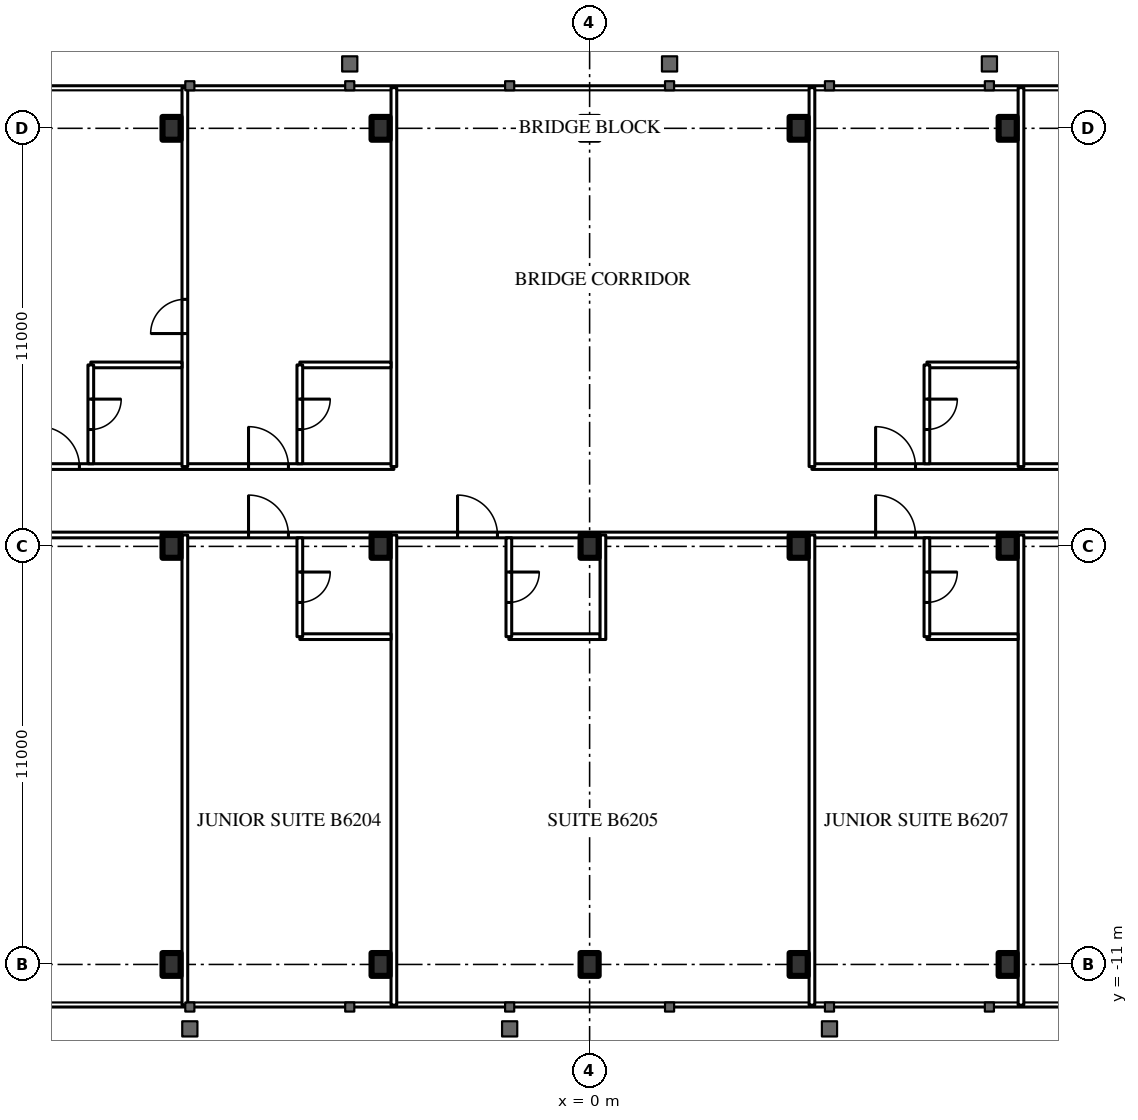
"""IFC4 building model, lengths in metres.
Left out: names, types, materials, properties, quantities, classifications, styles, units other than length and angle.
Written with IfcOpenShell. Run it as: python <this file> out.ifc"""

import sys

from ifc_helpers import new_model, si_unit, direction, frame, frame_2d, origin, origin_2d, place, context, subcontext, project, spatial, rectangle, i_section, extrude, element, fill, save


model = new_model("IFC4")
c1 = context("Model", 3, precision=1e-05, world=origin(), true_north=direction((0.0, 1.0)))
c2 = subcontext(c1, "Body", "Model", "MODEL_VIEW")
j1 = project(units=[si_unit("LENGTHUNIT", "METRE"), si_unit("PLANEANGLEUNIT", "RADIAN")], contexts=[c1])
p1 = place(None, origin())
s1 = spatial("IfcSite", under=j1, at=p1, CompositionType="ELEMENT")
p2 = place(p1, origin())
s2 = spatial("IfcBuilding", under=s1, at=p2, CompositionType="ELEMENT")
p3 = place(p2, frame((0.0, 0.0, 233.3)))
s3 = spatial("IfcBuildingStorey", under=s2, at=p3, CompositionType="ELEMENT", Elevation=233.3)
for number, where, z_axis, x_axis in (
    (1, (-11.0, -11.0, 0.0), (0.0, 0.0, 1.0), (1.0, 0.0, 0.0)),
    (2, (-5.5, -11.0, 0.0), (0.0, 0.0, 1.0), (1.0, 0.0, 0.0)),
    (3, (0.0, -11.0, 0.0), (0.0, 0.0, 1.0), (1.0, 0.0, 0.0)),
    (4, (5.5, -11.0, 0.0), (0.0, 0.0, 1.0), (1.0, 0.0, 0.0)),
    (5, (11.0, -11.0, 0.0), (0.0, 0.0, 1.0), (1.0, 0.0, 0.0)),
    (6, (-11.0, 0.0, 0.0), (0.0, 0.0, 1.0), (1.0, 0.0, 0.0)),
    (7, (-5.5, 0.0, 0.0), (0.0, 0.0, 1.0), (1.0, 0.0, 0.0)),
    (8, (0.0, 0.0, 0.0), (0.0, 0.0, 1.0), (1.0, 0.0, 0.0)),
    (9, (5.5, 0.0, 0.0), (0.0, 0.0, 1.0), (1.0, 0.0, 0.0)),
    (10, (11.0, 0.0, 0.0), (0.0, 0.0, 1.0), (1.0, 0.0, 0.0)),
    (11, (-11.0, 11.0, 0.0), (0.0, 0.0, 1.0), (1.0, 0.0, 0.0)),
    (12, (-5.5, 11.0, 0.0), (0.0, 0.0, 1.0), (1.0, 0.0, 0.0)),
    (13, (0.0, 11.0, 0.0), (0.0, 0.0, 1.0), (1.0, 0.0, 0.0)),
    (14, (5.5, 11.0, 0.0), (0.0, 0.0, 1.0), (1.0, 0.0, 0.0)),
    (15, (11.0, 11.0, 0.0), (0.0, 0.0, 1.0), (1.0, 0.0, 0.0)),
):
    element("IfcColumn", number, at=place(p3, frame(where, z_axis=z_axis, x_axis=x_axis)), inside=s3, PredefinedType="COLUMN", context=c2, shape_type="SweptSolid", body=[
        extrude(i_section(OverallWidth=0.476, OverallDepth=0.6, WebThickness=0.1, FlangeThickness=0.14, FilletRadius=0.02, at=origin_2d()), origin(), (0.0, 0.0, 1.0), 3.6),
    ])
p4 = place(p3, frame((-27.5, 0.3, 0.0), z_axis=(0.0, 0.0, 1.0), x_axis=(1.0, 0.0, 0.0)))
e16 = element("IfcWall", 16, at=p4, inside=s3, PredefinedType="PARTITIONING", context=c2, shape_type="SweptSolid", body=[
    extrude(rectangle(XDim=55.0, YDim=0.15, at=frame_2d((27.5, 0.0))), origin(), (0.0, 0.0, 1.0), 2.4),
])
p5 = place(p4, frame((1.575, 0.0, 0.0)))
e17 = element("IfcOpeningElement", 17, at=p5, cuts=e16, PredefinedType="OPENING", context=c2, shape_type="SweptSolid", body=[
    extrude(rectangle(XDim=1.0, YDim=2.2, at=frame_2d((0.5, 1.1))), frame((0.0, 0.085, 0.0), z_axis=(0.0, -1.0, 0.0), x_axis=(1.0, 0.0, 0.0)), (0.0, 0.0, 1.0), 0.17),
])
p6 = place(p4, frame((7.525, 0.0, 0.0)))
e18 = element("IfcOpeningElement", 18, at=p6, cuts=e16, PredefinedType="OPENING", context=c2, shape_type="SweptSolid", body=[
    extrude(rectangle(XDim=1.05, YDim=2.4, at=frame_2d((0.525, 1.2))), frame((0.0, 0.085, 0.0), z_axis=(0.0, -1.0, 0.0), x_axis=(1.0, 0.0, 0.0)), (0.0, 0.0, 1.0), 0.17),
])
p7 = place(p4, frame((18.525, 0.0, 0.0)))
e19 = element("IfcOpeningElement", 19, at=p7, cuts=e16, PredefinedType="OPENING", context=c2, shape_type="SweptSolid", body=[
    extrude(rectangle(XDim=1.05, YDim=2.4, at=frame_2d((0.525, 1.2))), frame((0.0, 0.085, 0.0), z_axis=(0.0, -1.0, 0.0), x_axis=(1.0, 0.0, 0.0)), (0.0, 0.0, 1.0), 0.17),
])
p8 = place(p4, frame((24.025, 0.0, 0.0)))
e20 = element("IfcOpeningElement", 20, at=p8, cuts=e16, PredefinedType="OPENING", context=c2, shape_type="SweptSolid", body=[
    extrude(rectangle(XDim=1.05, YDim=2.4, at=frame_2d((0.525, 1.2))), frame((0.0, 0.085, 0.0), z_axis=(0.0, -1.0, 0.0), x_axis=(1.0, 0.0, 0.0)), (0.0, 0.0, 1.0), 0.17),
])
p9 = place(p4, frame((35.025, 0.0, 0.0)))
e21 = element("IfcOpeningElement", 21, at=p9, cuts=e16, PredefinedType="OPENING", context=c2, shape_type="SweptSolid", body=[
    extrude(rectangle(XDim=1.05, YDim=2.4, at=frame_2d((0.525, 1.2))), frame((0.0, 0.085, 0.0), z_axis=(0.0, -1.0, 0.0), x_axis=(1.0, 0.0, 0.0)), (0.0, 0.0, 1.0), 0.17),
])
p10 = place(p4, frame((40.525, 0.0, 0.0)))
e22 = element("IfcOpeningElement", 22, at=p10, cuts=e16, PredefinedType="OPENING", context=c2, shape_type="SweptSolid", body=[
    extrude(rectangle(XDim=1.05, YDim=2.4, at=frame_2d((0.525, 1.2))), frame((0.0, 0.085, 0.0), z_axis=(0.0, -1.0, 0.0), x_axis=(1.0, 0.0, 0.0)), (0.0, 0.0, 1.0), 0.17),
])
p11 = place(p4, frame((52.525, 0.0, 0.0)))
e23 = element("IfcOpeningElement", 23, at=p11, cuts=e16, PredefinedType="OPENING", context=c2, shape_type="SweptSolid", body=[
    extrude(rectangle(XDim=1.05, YDim=2.4, at=frame_2d((0.525, 1.2))), frame((0.0, 0.085, 0.0), z_axis=(0.0, -1.0, 0.0), x_axis=(1.0, 0.0, 0.0)), (0.0, 0.0, 1.0), 0.17),
])
p12 = place(p3, frame((-27.5, 2.1, 0.0), z_axis=(0.0, 0.0, 1.0), x_axis=(1.0, 0.0, 0.0)))
e24 = element("IfcWall", 24, at=p12, inside=s3, PredefinedType="PARTITIONING", context=c2, shape_type="SweptSolid", body=[
    extrude(rectangle(XDim=22.35, YDim=0.15, at=frame_2d((11.175, 0.0))), origin(), (0.0, 0.0, 1.0), 3.4),
])
p13 = place(p12, frame((2.025, 0.0, 0.0)))
e25 = element("IfcOpeningElement", 25, at=p13, cuts=e24, PredefinedType="OPENING", context=c2, shape_type="SweptSolid", body=[
    extrude(rectangle(XDim=1.05, YDim=2.4, at=frame_2d((0.525, 1.2))), frame((0.0, 0.085, 0.0), z_axis=(0.0, -1.0, 0.0), x_axis=(1.0, 0.0, 0.0)), (0.0, 0.0, 1.0), 0.17),
])
p14 = place(p12, frame((7.525, 0.0, 0.0)))
e26 = element("IfcOpeningElement", 26, at=p14, cuts=e24, PredefinedType="OPENING", context=c2, shape_type="SweptSolid", body=[
    extrude(rectangle(XDim=1.05, YDim=2.4, at=frame_2d((0.525, 1.2))), frame((0.0, 0.085, 0.0), z_axis=(0.0, -1.0, 0.0), x_axis=(1.0, 0.0, 0.0)), (0.0, 0.0, 1.0), 0.17),
])
p15 = place(p12, frame((13.025, 0.0, 0.0)))
e27 = element("IfcOpeningElement", 27, at=p15, cuts=e24, PredefinedType="OPENING", context=c2, shape_type="SweptSolid", body=[
    extrude(rectangle(XDim=1.05, YDim=2.4, at=frame_2d((0.525, 1.2))), frame((0.0, 0.085, 0.0), z_axis=(0.0, -1.0, 0.0), x_axis=(1.0, 0.0, 0.0)), (0.0, 0.0, 1.0), 0.17),
])
p16 = place(p12, frame((18.525, 0.0, 0.0)))
e28 = element("IfcOpeningElement", 28, at=p16, cuts=e24, PredefinedType="OPENING", context=c2, shape_type="SweptSolid", body=[
    extrude(rectangle(XDim=1.05, YDim=2.4, at=frame_2d((0.525, 1.2))), frame((0.0, 0.085, 0.0), z_axis=(0.0, -1.0, 0.0), x_axis=(1.0, 0.0, 0.0)), (0.0, 0.0, 1.0), 0.17),
])
p17 = place(p3, frame((5.85, 2.1, 0.0), z_axis=(0.0, 0.0, 1.0), x_axis=(1.0, 0.0, 0.0)))
e29 = element("IfcWall", 29, at=p17, inside=s3, PredefinedType="PARTITIONING", context=c2, shape_type="SweptSolid", body=[
    extrude(rectangle(XDim=21.65, YDim=0.15, at=frame_2d((10.825, 0.0))), origin(), (0.0, 0.0, 1.0), 3.4),
])
p18 = place(p17, frame((1.675, 0.0, 0.0)))
e30 = element("IfcOpeningElement", 30, at=p18, cuts=e29, PredefinedType="OPENING", context=c2, shape_type="SweptSolid", body=[
    extrude(rectangle(XDim=1.05, YDim=2.4, at=frame_2d((0.525, 1.2))), frame((0.0, 0.085, 0.0), z_axis=(0.0, -1.0, 0.0), x_axis=(1.0, 0.0, 0.0)), (0.0, 0.0, 1.0), 0.17),
])
p19 = place(p17, frame((7.175, 0.0, 0.0)))
e31 = element("IfcOpeningElement", 31, at=p19, cuts=e29, PredefinedType="OPENING", context=c2, shape_type="SweptSolid", body=[
    extrude(rectangle(XDim=1.05, YDim=2.4, at=frame_2d((0.525, 1.2))), frame((0.0, 0.085, 0.0), z_axis=(0.0, -1.0, 0.0), x_axis=(1.0, 0.0, 0.0)), (0.0, 0.0, 1.0), 0.17),
])
p20 = place(p17, frame((19.175, 0.0, 0.0)))
e32 = element("IfcOpeningElement", 32, at=p20, cuts=e29, PredefinedType="OPENING", context=c2, shape_type="SweptSolid", body=[
    extrude(rectangle(XDim=1.05, YDim=2.4, at=frame_2d((0.525, 1.2))), frame((0.0, 0.085, 0.0), z_axis=(0.0, -1.0, 0.0), x_axis=(1.0, 0.0, 0.0)), (0.0, 0.0, 1.0), 0.17),
])
for number, where, z_axis, x_axis in (
    (33, (-10.65, -12.07, 0.0), (0.0, 0.0, 1.0), (0.0, 1.0, 0.0)),
    (34, (-5.15, -12.07, 0.0), (0.0, 0.0, 1.0), (0.0, 1.0, 0.0)),
    (35, (5.85, -12.07, 0.0), (0.0, 0.0, 1.0), (0.0, 1.0, 0.0)),
    (36, (11.35, -12.07, 0.0), (0.0, 0.0, 1.0), (0.0, 1.0, 0.0)),
):
    element("IfcWall", number, at=place(p3, frame(where, z_axis=z_axis, x_axis=x_axis)), inside=s3, PredefinedType="PARTITIONING", context=c2, shape_type="SweptSolid", body=[
        extrude(rectangle(XDim=12.37, YDim=0.15, at=frame_2d((6.185, 0.0))), origin(), (0.0, 0.0, 1.0), 3.4),
    ])
p21 = place(p3, frame((-7.625, -2.375, 0.0), z_axis=(0.0, 0.0, 1.0), x_axis=(1.0, 0.0, 0.0)))
e37 = element("IfcWall", 37, at=p21, inside=s3, PredefinedType="PARTITIONING", context=c2, shape_type="SweptSolid", body=[
    extrude(rectangle(XDim=2.4, YDim=0.15, at=frame_2d((1.2, 0.0))), origin(), (0.0, 0.0, 1.0), 3.4),
])
p22 = place(p3, frame((-7.625, -2.375, 0.0), z_axis=(0.0, 0.0, 1.0), x_axis=(0.0, 1.0, 0.0)))
e38 = element("IfcWall", 38, at=p22, inside=s3, PredefinedType="PARTITIONING", context=c2, shape_type="SweptSolid", body=[
    extrude(rectangle(XDim=2.6, YDim=0.15, at=frame_2d((1.3, 0.0))), origin(), (0.0, 0.0, 1.0), 3.4),
])
p23 = place(p22, frame((0.9, 0.0, 0.0)))
e39 = element("IfcOpeningElement", 39, at=p23, cuts=e38, PredefinedType="OPENING", context=c2, shape_type="SweptSolid", body=[
    extrude(rectangle(XDim=0.8, YDim=2.2, at=frame_2d((0.4, 1.1))), frame((0.0, 0.085, 0.0), z_axis=(0.0, -1.0, 0.0), x_axis=(1.0, 0.0, 0.0)), (0.0, 0.0, 1.0), 0.17),
])
p24 = place(p3, frame((-2.125, -2.375, 0.0), z_axis=(0.0, 0.0, 1.0), x_axis=(1.0, 0.0, 0.0)))
e40 = element("IfcWall", 40, at=p24, inside=s3, PredefinedType="PARTITIONING", context=c2, shape_type="SweptSolid", body=[
    extrude(rectangle(XDim=2.4, YDim=0.15, at=frame_2d((1.2, 0.0))), origin(), (0.0, 0.0, 1.0), 3.4),
])
p25 = place(p3, frame((-2.125, -2.375, 0.0), z_axis=(0.0, 0.0, 1.0), x_axis=(0.0, 1.0, 0.0)))
e41 = element("IfcWall", 41, at=p25, inside=s3, PredefinedType="PARTITIONING", context=c2, shape_type="SweptSolid", body=[
    extrude(rectangle(XDim=2.6, YDim=0.15, at=frame_2d((1.3, 0.0))), origin(), (0.0, 0.0, 1.0), 3.4),
])
p26 = place(p25, frame((0.9, 0.0, 0.0)))
e42 = element("IfcOpeningElement", 42, at=p26, cuts=e41, PredefinedType="OPENING", context=c2, shape_type="SweptSolid", body=[
    extrude(rectangle(XDim=0.8, YDim=2.2, at=frame_2d((0.4, 1.1))), frame((0.0, 0.085, 0.0), z_axis=(0.0, -1.0, 0.0), x_axis=(1.0, 0.0, 0.0)), (0.0, 0.0, 1.0), 0.17),
])
p27 = place(p3, frame((8.875, -2.375, 0.0), z_axis=(0.0, 0.0, 1.0), x_axis=(1.0, 0.0, 0.0)))
e43 = element("IfcWall", 43, at=p27, inside=s3, PredefinedType="PARTITIONING", context=c2, shape_type="SweptSolid", body=[
    extrude(rectangle(XDim=2.4, YDim=0.15, at=frame_2d((1.2, 0.0))), origin(), (0.0, 0.0, 1.0), 3.4),
])
p28 = place(p3, frame((8.875, -2.375, 0.0), z_axis=(0.0, 0.0, 1.0), x_axis=(0.0, 1.0, 0.0)))
e44 = element("IfcWall", 44, at=p28, inside=s3, PredefinedType="PARTITIONING", context=c2, shape_type="SweptSolid", body=[
    extrude(rectangle(XDim=2.6, YDim=0.15, at=frame_2d((1.3, 0.0))), origin(), (0.0, 0.0, 1.0), 3.4),
])
p29 = place(p28, frame((0.9, 0.0, 0.0)))
e45 = element("IfcOpeningElement", 45, at=p29, cuts=e44, PredefinedType="OPENING", context=c2, shape_type="SweptSolid", body=[
    extrude(rectangle(XDim=0.8, YDim=2.2, at=frame_2d((0.4, 1.1))), frame((0.0, 0.085, 0.0), z_axis=(0.0, -1.0, 0.0), x_axis=(1.0, 0.0, 0.0)), (0.0, 0.0, 1.0), 0.17),
])
p30 = place(p3, frame((-10.65, 2.1, 0.0), z_axis=(0.0, 0.0, 1.0), x_axis=(0.0, 1.0, 0.0)))
e46 = element("IfcWall", 46, at=p30, inside=s3, PredefinedType="PARTITIONING", context=c2, shape_type="SweptSolid", body=[
    extrude(rectangle(XDim=9.97, YDim=0.15, at=frame_2d((4.985, 0.0))), origin(), (0.0, 0.0, 1.0), 3.4),
])
p31 = place(p30, frame((3.5, 0.0, 0.0)))
e47 = element("IfcOpeningElement", 47, at=p31, cuts=e46, PredefinedType="OPENING", context=c2, shape_type="SweptSolid", body=[
    extrude(rectangle(XDim=0.9, YDim=2.2, at=frame_2d((0.45, 1.1))), frame((0.0, 0.085, 0.0), z_axis=(0.0, -1.0, 0.0), x_axis=(1.0, 0.0, 0.0)), (0.0, 0.0, 1.0), 0.17),
])
for number, where, z_axis, x_axis in (
    (48, (-5.15, 2.1, 0.0), (0.0, 0.0, 1.0), (0.0, 1.0, 0.0)),
    (49, (5.85, 2.1, 0.0), (0.0, 0.0, 1.0), (0.0, 1.0, 0.0)),
    (50, (11.35, 2.1, 0.0), (0.0, 0.0, 1.0), (0.0, 1.0, 0.0)),
):
    element("IfcWall", number, at=place(p3, frame(where, z_axis=z_axis, x_axis=x_axis)), inside=s3, PredefinedType="PARTITIONING", context=c2, shape_type="SweptSolid", body=[
        extrude(rectangle(XDim=9.97, YDim=0.15, at=frame_2d((4.985, 0.0))), origin(), (0.0, 0.0, 1.0), 3.4),
    ])
p32 = place(p3, frame((-13.125, 4.775, 0.0), z_axis=(0.0, 0.0, 1.0), x_axis=(1.0, 0.0, 0.0)))
e51 = element("IfcWall", 51, at=p32, inside=s3, PredefinedType="PARTITIONING", context=c2, shape_type="SweptSolid", body=[
    extrude(rectangle(XDim=2.4, YDim=0.15, at=frame_2d((1.2, 0.0))), origin(), (0.0, 0.0, 1.0), 3.4),
])
p33 = place(p3, frame((-13.125, 2.175, 0.0), z_axis=(0.0, 0.0, 1.0), x_axis=(0.0, 1.0, 0.0)))
e52 = element("IfcWall", 52, at=p33, inside=s3, PredefinedType="PARTITIONING", context=c2, shape_type="SweptSolid", body=[
    extrude(rectangle(XDim=2.6, YDim=0.15, at=frame_2d((1.3, 0.0))), origin(), (0.0, 0.0, 1.0), 3.4),
])
p34 = place(p33, frame((0.9, 0.0, 0.0)))
e53 = element("IfcOpeningElement", 53, at=p34, cuts=e52, PredefinedType="OPENING", context=c2, shape_type="SweptSolid", body=[
    extrude(rectangle(XDim=0.8, YDim=2.2, at=frame_2d((0.4, 1.1))), frame((0.0, 0.085, 0.0), z_axis=(0.0, -1.0, 0.0), x_axis=(1.0, 0.0, 0.0)), (0.0, 0.0, 1.0), 0.17),
])
p35 = place(p3, frame((-7.625, 4.775, 0.0), z_axis=(0.0, 0.0, 1.0), x_axis=(1.0, 0.0, 0.0)))
e54 = element("IfcWall", 54, at=p35, inside=s3, PredefinedType="PARTITIONING", context=c2, shape_type="SweptSolid", body=[
    extrude(rectangle(XDim=2.4, YDim=0.15, at=frame_2d((1.2, 0.0))), origin(), (0.0, 0.0, 1.0), 3.4),
])
p36 = place(p3, frame((-7.625, 2.175, 0.0), z_axis=(0.0, 0.0, 1.0), x_axis=(0.0, 1.0, 0.0)))
e55 = element("IfcWall", 55, at=p36, inside=s3, PredefinedType="PARTITIONING", context=c2, shape_type="SweptSolid", body=[
    extrude(rectangle(XDim=2.6, YDim=0.15, at=frame_2d((1.3, 0.0))), origin(), (0.0, 0.0, 1.0), 3.4),
])
p37 = place(p36, frame((0.9, 0.0, 0.0)))
e56 = element("IfcOpeningElement", 56, at=p37, cuts=e55, PredefinedType="OPENING", context=c2, shape_type="SweptSolid", body=[
    extrude(rectangle(XDim=0.8, YDim=2.2, at=frame_2d((0.4, 1.1))), frame((0.0, 0.085, 0.0), z_axis=(0.0, -1.0, 0.0), x_axis=(1.0, 0.0, 0.0)), (0.0, 0.0, 1.0), 0.17),
])
p38 = place(p3, frame((8.875, 4.775, 0.0), z_axis=(0.0, 0.0, 1.0), x_axis=(1.0, 0.0, 0.0)))
e57 = element("IfcWall", 57, at=p38, inside=s3, PredefinedType="PARTITIONING", context=c2, shape_type="SweptSolid", body=[
    extrude(rectangle(XDim=2.4, YDim=0.15, at=frame_2d((1.2, 0.0))), origin(), (0.0, 0.0, 1.0), 3.4),
])
p39 = place(p3, frame((8.875, 2.175, 0.0), z_axis=(0.0, 0.0, 1.0), x_axis=(0.0, 1.0, 0.0)))
e58 = element("IfcWall", 58, at=p39, inside=s3, PredefinedType="PARTITIONING", context=c2, shape_type="SweptSolid", body=[
    extrude(rectangle(XDim=2.6, YDim=0.15, at=frame_2d((1.3, 0.0))), origin(), (0.0, 0.0, 1.0), 3.4),
])
p40 = place(p39, frame((0.9, 0.0, 0.0)))
e59 = element("IfcOpeningElement", 59, at=p40, cuts=e58, PredefinedType="OPENING", context=c2, shape_type="SweptSolid", body=[
    extrude(rectangle(XDim=0.8, YDim=2.2, at=frame_2d((0.4, 1.1))), frame((0.0, 0.085, 0.0), z_axis=(0.0, -1.0, 0.0), x_axis=(1.0, 0.0, 0.0)), (0.0, 0.0, 1.0), 0.17),
])
p41 = place(p3, frame((0.35, -2.45, 0.0), z_axis=(0.0, 0.0, 1.0), x_axis=(0.0, 1.0, 0.0)))
e60 = element("IfcWall", 60, at=p41, inside=s3, PredefinedType="PARTITIONING", context=c2, shape_type="SweptSolid", body=[
    extrude(rectangle(XDim=2.75, YDim=0.15, at=frame_2d((1.375, 0.0))), origin(), (0.0, 0.0, 1.0), 3.4),
])
p42 = place(p23, origin())
e61 = element("IfcDoor", 61, at=p42, inside=s3, OperationType="SINGLE_SWING_RIGHT", PredefinedType="DOOR", context=c2, shape_type="SweptSolid", body=[
    extrude(rectangle(XDim=0.8, YDim=2.2, at=frame_2d((0.4, 1.1))), frame((0.0, 0.025, 0.0), z_axis=(0.0, -1.0, 0.0), x_axis=(1.0, 0.0, 0.0)), (0.0, 0.0, 1.0), 0.05),
])
fill(e39, e61)
p43 = place(p7, origin())
e62 = element("IfcDoor", 62, at=p43, inside=s3, OperationType="SINGLE_SWING_LEFT", PredefinedType="DOOR", context=c2, shape_type="SweptSolid", body=[
    extrude(rectangle(XDim=1.05, YDim=2.4, at=frame_2d((0.525, 1.2))), frame((0.0, 0.025, 0.0), z_axis=(0.0, -1.0, 0.0), x_axis=(1.0, 0.0, 0.0)), (0.0, 0.0, 1.0), 0.05),
])
fill(e19, e62)
p44 = place(p26, origin())
e63 = element("IfcDoor", 63, at=p44, inside=s3, OperationType="SINGLE_SWING_RIGHT", PredefinedType="DOOR", context=c2, shape_type="SweptSolid", body=[
    extrude(rectangle(XDim=0.8, YDim=2.2, at=frame_2d((0.4, 1.1))), frame((0.0, 0.025, 0.0), z_axis=(0.0, -1.0, 0.0), x_axis=(1.0, 0.0, 0.0)), (0.0, 0.0, 1.0), 0.05),
])
fill(e42, e63)
p45 = place(p8, origin())
e64 = element("IfcDoor", 64, at=p45, inside=s3, OperationType="SINGLE_SWING_LEFT", PredefinedType="DOOR", context=c2, shape_type="SweptSolid", body=[
    extrude(rectangle(XDim=1.05, YDim=2.4, at=frame_2d((0.525, 1.2))), frame((0.0, 0.025, 0.0), z_axis=(0.0, -1.0, 0.0), x_axis=(1.0, 0.0, 0.0)), (0.0, 0.0, 1.0), 0.05),
])
fill(e20, e64)
p46 = place(p29, origin())
e65 = element("IfcDoor", 65, at=p46, inside=s3, OperationType="SINGLE_SWING_RIGHT", PredefinedType="DOOR", context=c2, shape_type="SweptSolid", body=[
    extrude(rectangle(XDim=0.8, YDim=2.2, at=frame_2d((0.4, 1.1))), frame((0.0, 0.025, 0.0), z_axis=(0.0, -1.0, 0.0), x_axis=(1.0, 0.0, 0.0)), (0.0, 0.0, 1.0), 0.05),
])
fill(e45, e65)
p47 = place(p9, origin())
e66 = element("IfcDoor", 66, at=p47, inside=s3, OperationType="SINGLE_SWING_LEFT", PredefinedType="DOOR", context=c2, shape_type="SweptSolid", body=[
    extrude(rectangle(XDim=1.05, YDim=2.4, at=frame_2d((0.525, 1.2))), frame((0.0, 0.025, 0.0), z_axis=(0.0, -1.0, 0.0), x_axis=(1.0, 0.0, 0.0)), (0.0, 0.0, 1.0), 0.05),
])
fill(e21, e66)
p48 = place(p34, origin())
e67 = element("IfcDoor", 67, at=p48, inside=s3, OperationType="SINGLE_SWING_RIGHT", PredefinedType="DOOR", context=c2, shape_type="SweptSolid", body=[
    extrude(rectangle(XDim=0.8, YDim=2.2, at=frame_2d((0.4, 1.1))), frame((0.0, 0.025, 0.0), z_axis=(0.0, -1.0, 0.0), x_axis=(1.0, 0.0, 0.0)), (0.0, 0.0, 1.0), 0.05),
])
fill(e53, e67)
p49 = place(p15, origin())
e68 = element("IfcDoor", 68, at=p49, inside=s3, OperationType="SINGLE_SWING_LEFT", PredefinedType="DOOR", context=c2, shape_type="SweptSolid", body=[
    extrude(rectangle(XDim=1.05, YDim=2.4, at=frame_2d((0.525, 1.2))), frame((0.0, 0.025, 0.0), z_axis=(0.0, -1.0, 0.0), x_axis=(1.0, 0.0, 0.0)), (0.0, 0.0, 1.0), 0.05),
])
fill(e27, e68)
p50 = place(p37, origin())
e69 = element("IfcDoor", 69, at=p50, inside=s3, OperationType="SINGLE_SWING_RIGHT", PredefinedType="DOOR", context=c2, shape_type="SweptSolid", body=[
    extrude(rectangle(XDim=0.8, YDim=2.2, at=frame_2d((0.4, 1.1))), frame((0.0, 0.025, 0.0), z_axis=(0.0, -1.0, 0.0), x_axis=(1.0, 0.0, 0.0)), (0.0, 0.0, 1.0), 0.05),
])
fill(e56, e69)
p51 = place(p16, origin())
e70 = element("IfcDoor", 70, at=p51, inside=s3, OperationType="SINGLE_SWING_LEFT", PredefinedType="DOOR", context=c2, shape_type="SweptSolid", body=[
    extrude(rectangle(XDim=1.05, YDim=2.4, at=frame_2d((0.525, 1.2))), frame((0.0, 0.025, 0.0), z_axis=(0.0, -1.0, 0.0), x_axis=(1.0, 0.0, 0.0)), (0.0, 0.0, 1.0), 0.05),
])
fill(e28, e70)
p52 = place(p40, origin())
e71 = element("IfcDoor", 71, at=p52, inside=s3, OperationType="SINGLE_SWING_RIGHT", PredefinedType="DOOR", context=c2, shape_type="SweptSolid", body=[
    extrude(rectangle(XDim=0.8, YDim=2.2, at=frame_2d((0.4, 1.1))), frame((0.0, 0.025, 0.0), z_axis=(0.0, -1.0, 0.0), x_axis=(1.0, 0.0, 0.0)), (0.0, 0.0, 1.0), 0.05),
])
fill(e59, e71)
p53 = place(p18, origin())
e72 = element("IfcDoor", 72, at=p53, inside=s3, OperationType="SINGLE_SWING_LEFT", PredefinedType="DOOR", context=c2, shape_type="SweptSolid", body=[
    extrude(rectangle(XDim=1.05, YDim=2.4, at=frame_2d((0.525, 1.2))), frame((0.0, 0.025, 0.0), z_axis=(0.0, -1.0, 0.0), x_axis=(1.0, 0.0, 0.0)), (0.0, 0.0, 1.0), 0.05),
])
fill(e30, e72)
p54 = place(p31, origin())
e73 = element("IfcDoor", 73, at=p54, inside=s3, OperationType="SINGLE_SWING_LEFT", PredefinedType="DOOR", context=c2, shape_type="SweptSolid", body=[
    extrude(rectangle(XDim=0.9, YDim=2.2, at=frame_2d((0.45, 1.1))), frame((0.0, 0.025, 0.0), z_axis=(0.0, -1.0, 0.0), x_axis=(1.0, 0.0, 0.0)), (0.0, 0.0, 1.0), 0.05),
])
fill(e47, e73)
save(model, sys.argv[1])
